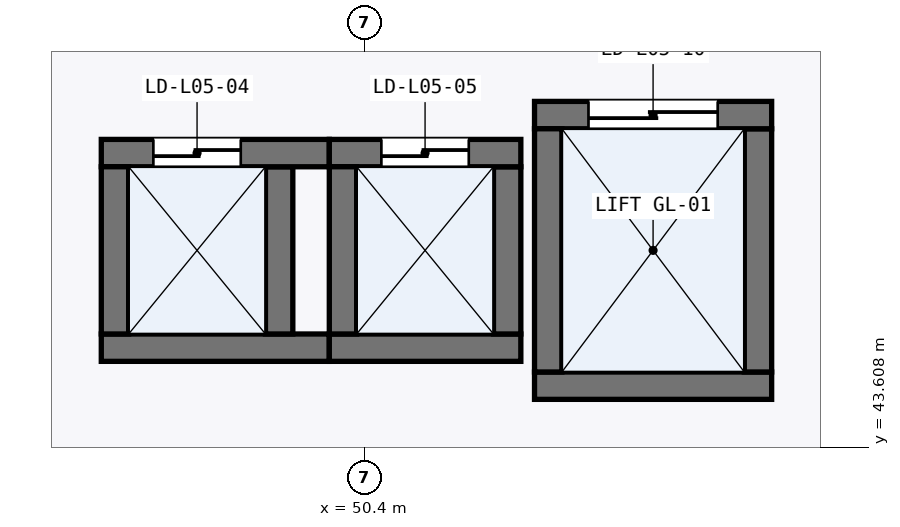
"""IFC4 building model, lengths in metres.
Left out: names, types, materials, properties, quantities, classifications, styles, units other than length and angle.
Written with IfcOpenShell. Run it as: python <this file> out.ifc"""

import sys

from ifc_helpers import new_model, si_unit, direction, frame, frame_2d, origin, place, context, subcontext, project, spatial, rectangle, extrude, element, fill, save


model = new_model("IFC4")
c1 = context("Model", 3, precision=1e-05, world=origin(), true_north=direction((0.0, 1.0)))
c2 = subcontext(c1, "Body", "Model", "MODEL_VIEW")
j1 = project(units=[si_unit("LENGTHUNIT", "METRE"), si_unit("PLANEANGLEUNIT", "RADIAN")], contexts=[c1])
p1 = place(None, origin())
s1 = spatial("IfcSite", under=j1, at=p1, CompositionType="ELEMENT")
p2 = place(p1, origin())
s2 = spatial("IfcBuilding", under=s1, at=p2, CompositionType="ELEMENT")
p3 = place(p2, frame((0.0, 0.0, 21.6)))
s3 = spatial("IfcBuildingStorey", under=s2, at=p3, CompositionType="ELEMENT", Elevation=21.6)
p4 = place(p3, frame((46.94, 44.92, 0.0), z_axis=(0.0, 0.0, 1.0), x_axis=(1.0, 0.0, 0.0)))
e1 = element("IfcWall", 1, at=p4, inside=s3, PredefinedType="SHEAR", context=c2, shape_type="SweptSolid", body=[
    extrude(rectangle(XDim=3.0, YDim=0.36, at=frame_2d((1.5, 0.0))), origin(), (0.0, 0.0, 1.0), 4.845),
])
p5 = place(p3, frame((49.28, 45.1, 0.0), z_axis=(0.0, 0.0, 1.0), x_axis=(0.0, 1.0, 0.0)))
e2 = element("IfcWall", 2, at=p5, inside=s3, PredefinedType="SHEAR", context=c2, shape_type="SweptSolid", body=[
    extrude(rectangle(XDim=2.2, YDim=0.36, at=frame_2d((1.1, 0.0))), origin(), (0.0, 0.0, 1.0), 4.845),
])
p6 = place(p3, frame((49.94, 47.48, 0.0), z_axis=(0.0, 0.0, 1.0), x_axis=(-1.0, 0.0, 0.0)))
e3 = element("IfcWall", 3, at=p6, inside=s3, PredefinedType="SHEAR", context=c2, shape_type="SweptSolid", body=[
    extrude(rectangle(XDim=3.0, YDim=0.36, at=frame_2d((1.5, 0.0))), origin(), (0.0, 0.0, 1.0), 4.845),
])
p7 = place(p6, frame((1.165, 0.0, 0.0)))
e4 = element("IfcOpeningElement", 4, at=p7, cuts=e3, PredefinedType="OPENING", context=c2, shape_type="SweptSolid", body=[
    extrude(rectangle(XDim=1.15, YDim=2.2, at=frame_2d((0.575, 1.1))), frame((0.0, 0.19, 0.0), z_axis=(0.0, -1.0, 0.0), x_axis=(1.0, 0.0, 0.0)), (0.0, 0.0, 1.0), 0.38),
])
p8 = place(p3, frame((47.12, 47.3, 0.0), z_axis=(0.0, 0.0, 1.0), x_axis=(0.0, -1.0, 0.0)))
e5 = element("IfcWall", 5, at=p8, inside=s3, PredefinedType="SHEAR", context=c2, shape_type="SweptSolid", body=[
    extrude(rectangle(XDim=2.2, YDim=0.36, at=frame_2d((1.1, 0.0))), origin(), (0.0, 0.0, 1.0), 4.845),
])
p9 = place(p3, frame((49.94, 44.92, 0.0), z_axis=(0.0, 0.0, 1.0), x_axis=(1.0, 0.0, 0.0)))
e6 = element("IfcWall", 6, at=p9, inside=s3, PredefinedType="SHEAR", context=c2, shape_type="SweptSolid", body=[
    extrude(rectangle(XDim=2.52, YDim=0.36, at=frame_2d((1.26, 0.0))), origin(), (0.0, 0.0, 1.0), 4.845),
])
p10 = place(p3, frame((52.28, 45.1, 0.0), z_axis=(0.0, 0.0, 1.0), x_axis=(0.0, 1.0, 0.0)))
e7 = element("IfcWall", 7, at=p10, inside=s3, PredefinedType="SHEAR", context=c2, shape_type="SweptSolid", body=[
    extrude(rectangle(XDim=2.2, YDim=0.36, at=frame_2d((1.1, 0.0))), origin(), (0.0, 0.0, 1.0), 4.845),
])
p11 = place(p3, frame((52.46, 47.48, 0.0), z_axis=(0.0, 0.0, 1.0), x_axis=(-1.0, 0.0, 0.0)))
e8 = element("IfcWall", 8, at=p11, inside=s3, PredefinedType="SHEAR", context=c2, shape_type="SweptSolid", body=[
    extrude(rectangle(XDim=2.52, YDim=0.36, at=frame_2d((1.26, 0.0))), origin(), (0.0, 0.0, 1.0), 4.845),
])
p12 = place(p11, frame((0.685, 0.0, 0.0)))
e9 = element("IfcOpeningElement", 9, at=p12, cuts=e8, PredefinedType="OPENING", context=c2, shape_type="SweptSolid", body=[
    extrude(rectangle(XDim=1.15, YDim=2.2, at=frame_2d((0.575, 1.1))), frame((0.0, 0.19, 0.0), z_axis=(0.0, -1.0, 0.0), x_axis=(1.0, 0.0, 0.0)), (0.0, 0.0, 1.0), 0.38),
])
p13 = place(p3, frame((50.12, 47.3, 0.0), z_axis=(0.0, 0.0, 1.0), x_axis=(0.0, -1.0, 0.0)))
e10 = element("IfcWall", 10, at=p13, inside=s3, PredefinedType="SHEAR", context=c2, shape_type="SweptSolid", body=[
    extrude(rectangle(XDim=2.2, YDim=0.36, at=frame_2d((1.1, 0.0))), origin(), (0.0, 0.0, 1.0), 4.845),
])
p14 = place(p3, frame((52.64, 44.42, 0.0), z_axis=(0.0, 0.0, 1.0), x_axis=(1.0, 0.0, 0.0)))
e11 = element("IfcWall", 11, at=p14, inside=s3, PredefinedType="SHEAR", context=c2, shape_type="SweptSolid", body=[
    extrude(rectangle(XDim=3.12, YDim=0.36, at=frame_2d((1.56, 0.0))), origin(), (0.0, 0.0, 1.0), 4.845),
])
p15 = place(p3, frame((55.58, 44.6, 0.0), z_axis=(0.0, 0.0, 1.0), x_axis=(0.0, 1.0, 0.0)))
e12 = element("IfcWall", 12, at=p15, inside=s3, PredefinedType="SHEAR", context=c2, shape_type="SweptSolid", body=[
    extrude(rectangle(XDim=3.2, YDim=0.36, at=frame_2d((1.6, 0.0))), origin(), (0.0, 0.0, 1.0), 4.845),
])
p16 = place(p3, frame((55.76, 47.98, 0.0), z_axis=(0.0, 0.0, 1.0), x_axis=(-1.0, 0.0, 0.0)))
e13 = element("IfcWall", 13, at=p16, inside=s3, PredefinedType="SHEAR", context=c2, shape_type="SweptSolid", body=[
    extrude(rectangle(XDim=3.12, YDim=0.36, at=frame_2d((1.56, 0.0))), origin(), (0.0, 0.0, 1.0), 4.845),
])
p17 = place(p16, frame((0.71, 0.0, 0.0)))
e14 = element("IfcOpeningElement", 14, at=p17, cuts=e13, PredefinedType="OPENING", context=c2, shape_type="SweptSolid", body=[
    extrude(rectangle(XDim=1.7, YDim=2.3, at=frame_2d((0.85, 1.15))), frame((0.0, 0.19, 0.0), z_axis=(0.0, -1.0, 0.0), x_axis=(1.0, 0.0, 0.0)), (0.0, 0.0, 1.0), 0.38),
])
p18 = place(p3, frame((52.82, 47.8, 0.0), z_axis=(0.0, 0.0, 1.0), x_axis=(0.0, -1.0, 0.0)))
e15 = element("IfcWall", 15, at=p18, inside=s3, PredefinedType="SHEAR", context=c2, shape_type="SweptSolid", body=[
    extrude(rectangle(XDim=3.2, YDim=0.36, at=frame_2d((1.6, 0.0))), origin(), (0.0, 0.0, 1.0), 4.845),
])
p19 = place(p7, frame((1.15, 0.0, 0.0), z_axis=(0.0, 0.0, 1.0), x_axis=(-1.0, 0.0, 0.0)))
e16 = element("IfcDoor", 16, at=p19, inside=s3, OperationType="DOUBLE_DOOR_SLIDING", PredefinedType="DOOR", context=c2, shape_type="SweptSolid", body=[
    extrude(rectangle(XDim=1.15, YDim=2.2, at=frame_2d((0.575, 1.1))), frame((0.0, 0.025, 0.0), z_axis=(0.0, -1.0, 0.0), x_axis=(1.0, 0.0, 0.0)), (0.0, 0.0, 1.0), 0.05),
])
fill(e4, e16)
p20 = place(p12, frame((1.15, 0.0, 0.0), z_axis=(0.0, 0.0, 1.0), x_axis=(-1.0, 0.0, 0.0)))
e17 = element("IfcDoor", 17, at=p20, inside=s3, OperationType="DOUBLE_DOOR_SLIDING", PredefinedType="DOOR", context=c2, shape_type="SweptSolid", body=[
    extrude(rectangle(XDim=1.15, YDim=2.2, at=frame_2d((0.575, 1.1))), frame((0.0, 0.025, 0.0), z_axis=(0.0, -1.0, 0.0), x_axis=(1.0, 0.0, 0.0)), (0.0, 0.0, 1.0), 0.05),
])
fill(e9, e17)
p21 = place(p17, frame((1.7, 0.0, 0.0), z_axis=(0.0, 0.0, 1.0), x_axis=(-1.0, 0.0, 0.0)))
e18 = element("IfcDoor", 18, at=p21, inside=s3, OperationType="DOUBLE_DOOR_SLIDING", PredefinedType="DOOR", context=c2, shape_type="SweptSolid", body=[
    extrude(rectangle(XDim=1.7, YDim=2.3, at=frame_2d((0.85, 1.15))), frame((0.0, 0.025, 0.0), z_axis=(0.0, -1.0, 0.0), x_axis=(1.0, 0.0, 0.0)), (0.0, 0.0, 1.0), 0.05),
])
fill(e14, e18)
save(model, sys.argv[1])
